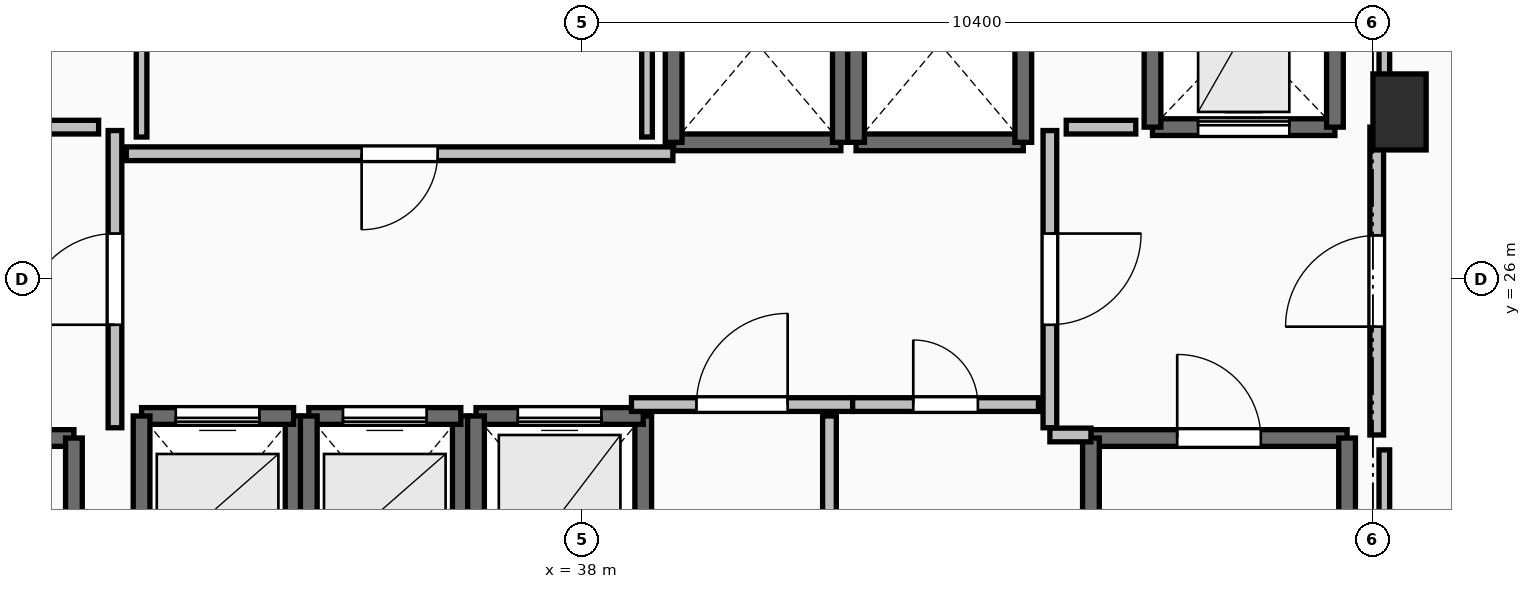
"""IFC4 building model, lengths in metres.
Left out: names, types, materials, properties, quantities, classifications, styles, units other than length and angle.
Written with IfcOpenShell. Run it as: python <this file> out.ifc"""

import sys

from ifc_helpers import new_model, si_unit, direction, frame, frame_2d, origin, origin_2d, place, context, subcontext, project, spatial, rectangle, extrude, element, fill, save


model = new_model("IFC4")
c1 = context("Model", 3, precision=1e-05, world=origin(), true_north=direction((0.0, 1.0)))
c2 = subcontext(c1, "Body", "Model", "MODEL_VIEW")
j1 = project(units=[si_unit("LENGTHUNIT", "METRE"), si_unit("PLANEANGLEUNIT", "RADIAN")], contexts=[c1])
p1 = place(None, origin())
s1 = spatial("IfcSite", under=j1, at=p1, CompositionType="ELEMENT")
p2 = place(p1, origin())
s2 = spatial("IfcBuilding", under=s1, at=p2, CompositionType="ELEMENT")
p3 = place(p2, frame((0.0, 0.0, 179.1)))
s3 = spatial("IfcBuildingStorey", under=s2, at=p3, CompositionType="ELEMENT", Elevation=179.1)
p4 = place(p3, frame((48.75, 28.2, 0.0), z_axis=(0.0, 0.0, 1.0), x_axis=(1.0, 0.0, 0.0)))
e1 = element("IfcColumn", 1, at=p4, inside=s3, PredefinedType="PILASTER", context=c2, shape_type="SweptSolid", body=[
    extrude(rectangle(XDim=0.7, YDim=1.0, at=origin_2d()), origin(), (0.0, 0.0, 1.0), 3.5),
])
p5 = place(p3, frame((27.94, 23.91, 0.0), z_axis=(0.0, 0.0, 1.0), x_axis=(1.0, 0.0, 0.0)))
e2 = element("IfcWall", 2, at=p5, inside=s3, PredefinedType="SOLIDWALL", context=c2, shape_type="SweptSolid", body=[
    extrude(rectangle(XDim=3.37, YDim=0.22, at=frame_2d((1.685, 0.0))), origin(), (0.0, 0.0, 1.0), 3.24),
])
p6 = place(p5, frame((1.135, 0.0, 0.0)))
e3 = element("IfcOpeningElement", 3, at=p6, cuts=e2, PredefinedType="OPENING", context=c2, shape_type="SweptSolid", body=[
    extrude(rectangle(XDim=1.1, YDim=2.15, at=frame_2d((0.55, 1.075))), frame((0.0, 0.125, 0.0), z_axis=(0.0, -1.0, 0.0), x_axis=(1.0, 0.0, 0.0)), (0.0, 0.0, 1.0), 0.25),
])
p7 = place(p3, frame((31.31, 23.91, 0.0), z_axis=(0.0, 0.0, 1.0), x_axis=(0.0, -1.0, 0.0)))
e4 = element("IfcWall", 4, at=p7, inside=s3, PredefinedType="SOLIDWALL", context=c2, shape_type="SweptSolid", body=[
    extrude(rectangle(XDim=7.42, YDim=0.22, at=frame_2d((3.71, 0.0))), origin(), (0.0, 0.0, 1.0), 3.24),
])
p8 = place(p3, frame((44.69, 23.91, 0.0), z_axis=(0.0, 0.0, 1.0), x_axis=(1.0, 0.0, 0.0)))
e5 = element("IfcWall", 5, at=p8, inside=s3, PredefinedType="SOLIDWALL", context=c2, shape_type="SweptSolid", body=[
    extrude(rectangle(XDim=3.37, YDim=0.22, at=frame_2d((1.685, 0.0))), origin(), (0.0, 0.0, 1.0), 3.24),
])
p9 = place(p8, frame((1.135, 0.0, 0.0)))
e6 = element("IfcOpeningElement", 6, at=p9, cuts=e5, PredefinedType="OPENING", context=c2, shape_type="SweptSolid", body=[
    extrude(rectangle(XDim=1.1, YDim=2.15, at=frame_2d((0.55, 1.075))), frame((0.0, 0.125, 0.0), z_axis=(0.0, -1.0, 0.0), x_axis=(1.0, 0.0, 0.0)), (0.0, 0.0, 1.0), 0.25),
])
for number, where, z_axis, x_axis in (
    (7, (48.06, 23.91, 0.0), (0.0, 0.0, 1.0), (0.0, -1.0, 0.0)),
    (8, (44.69, 16.49, 0.0), (0.0, 0.0, 1.0), (0.0, 1.0, 0.0)),
):
    element("IfcWall", number, at=place(p3, frame(where, z_axis=z_axis, x_axis=x_axis)), inside=s3, PredefinedType="SOLIDWALL", context=c2, shape_type="SweptSolid", body=[
        extrude(rectangle(XDim=7.42, YDim=0.22, at=frame_2d((3.71, 0.0))), origin(), (0.0, 0.0, 1.0), 3.24),
    ])
p10 = place(p3, frame((34.2, 21.8, 0.0), z_axis=(0.0, 0.0, 1.0), x_axis=(0.0, 1.0, 0.0)))
e9 = element("IfcWall", 9, at=p10, inside=s3, PredefinedType="SOLIDWALL", context=c2, shape_type="SweptSolid", body=[
    extrude(rectangle(XDim=2.4, YDim=0.22, at=frame_2d((1.2, 0.0))), origin(), (0.0, 0.0, 1.0), 3.24),
])
p11 = place(p3, frame((34.2, 24.2, 0.0), z_axis=(0.0, 0.0, 1.0), x_axis=(-1.0, 0.0, 0.0)))
e10 = element("IfcWall", 10, at=p11, inside=s3, PredefinedType="SOLIDWALL", context=c2, shape_type="SweptSolid", body=[
    extrude(rectangle(XDim=2.0, YDim=0.22, at=frame_2d((1.0, 0.0))), origin(), (0.0, 0.0, 1.0), 3.24),
])
p12 = place(p11, frame((0.45, 0.0, 0.0)))
e11 = element("IfcOpeningElement", 11, at=p12, cuts=e10, PredefinedType="OPENING", context=c2, shape_type="SweptSolid", body=[
    extrude(rectangle(XDim=1.1, YDim=2.2, at=frame_2d((0.55, 1.1))), frame((0.0, 0.125, 0.0), z_axis=(0.0, -1.0, 0.0), x_axis=(1.0, 0.0, 0.0)), (0.0, 0.0, 1.0), 0.25),
])
for number, where, z_axis, x_axis in (
    (12, (32.2, 24.2, 0.0), (0.0, 0.0, 1.0), (0.0, -1.0, 0.0)),
    (13, (36.4, 21.8, 0.0), (0.0, 0.0, 1.0), (0.0, 1.0, 0.0)),
):
    element("IfcWall", number, at=place(p3, frame(where, z_axis=z_axis, x_axis=x_axis)), inside=s3, PredefinedType="SOLIDWALL", context=c2, shape_type="SweptSolid", body=[
        extrude(rectangle(XDim=2.4, YDim=0.22, at=frame_2d((1.2, 0.0))), origin(), (0.0, 0.0, 1.0), 3.24),
    ])
p13 = place(p3, frame((36.4, 24.2, 0.0), z_axis=(0.0, 0.0, 1.0), x_axis=(-1.0, 0.0, 0.0)))
e14 = element("IfcWall", 14, at=p13, inside=s3, PredefinedType="SOLIDWALL", context=c2, shape_type="SweptSolid", body=[
    extrude(rectangle(XDim=2.0, YDim=0.22, at=frame_2d((1.0, 0.0))), origin(), (0.0, 0.0, 1.0), 3.24),
])
p14 = place(p13, frame((0.45, 0.0, 0.0)))
e15 = element("IfcOpeningElement", 15, at=p14, cuts=e14, PredefinedType="OPENING", context=c2, shape_type="SweptSolid", body=[
    extrude(rectangle(XDim=1.1, YDim=2.2, at=frame_2d((0.55, 1.1))), frame((0.0, 0.125, 0.0), z_axis=(0.0, -1.0, 0.0), x_axis=(1.0, 0.0, 0.0)), (0.0, 0.0, 1.0), 0.25),
])
p15 = place(p3, frame((34.4, 24.2, 0.0), z_axis=(0.0, 0.0, 1.0), x_axis=(0.0, -1.0, 0.0)))
e16 = element("IfcWall", 16, at=p15, inside=s3, PredefinedType="SOLIDWALL", context=c2, shape_type="SweptSolid", body=[
    extrude(rectangle(XDim=2.4, YDim=0.22, at=frame_2d((1.2, 0.0))), origin(), (0.0, 0.0, 1.0), 3.24),
])
p16 = place(p3, frame((38.8, 21.6, 0.0), z_axis=(0.0, 0.0, 1.0), x_axis=(0.0, 1.0, 0.0)))
e17 = element("IfcWall", 17, at=p16, inside=s3, PredefinedType="SOLIDWALL", context=c2, shape_type="SweptSolid", body=[
    extrude(rectangle(XDim=2.6, YDim=0.22, at=frame_2d((1.3, 0.0))), origin(), (0.0, 0.0, 1.0), 3.24),
])
p17 = place(p3, frame((38.8, 24.2, 0.0), z_axis=(0.0, 0.0, 1.0), x_axis=(-1.0, 0.0, 0.0)))
e18 = element("IfcWall", 18, at=p17, inside=s3, PredefinedType="SOLIDWALL", context=c2, shape_type="SweptSolid", body=[
    extrude(rectangle(XDim=2.2, YDim=0.22, at=frame_2d((1.1, 0.0))), origin(), (0.0, 0.0, 1.0), 3.24),
])
p18 = place(p17, frame((0.55, 0.0, 0.0)))
e19 = element("IfcOpeningElement", 19, at=p18, cuts=e18, PredefinedType="OPENING", context=c2, shape_type="SweptSolid", body=[
    extrude(rectangle(XDim=1.1, YDim=2.2, at=frame_2d((0.55, 1.1))), frame((0.0, 0.125, 0.0), z_axis=(0.0, -1.0, 0.0), x_axis=(1.0, 0.0, 0.0)), (0.0, 0.0, 1.0), 0.25),
])
p19 = place(p3, frame((36.6, 24.2, 0.0), z_axis=(0.0, 0.0, 1.0), x_axis=(0.0, -1.0, 0.0)))
e20 = element("IfcWall", 20, at=p19, inside=s3, PredefinedType="SOLIDWALL", context=c2, shape_type="SweptSolid", body=[
    extrude(rectangle(XDim=2.6, YDim=0.22, at=frame_2d((1.3, 0.0))), origin(), (0.0, 0.0, 1.0), 3.24),
])
p20 = place(p3, frame((39.2, 27.8, 0.0), z_axis=(0.0, 0.0, 1.0), x_axis=(1.0, 0.0, 0.0)))
e21 = element("IfcWall", 21, at=p20, inside=s3, PredefinedType="SOLIDWALL", context=c2, shape_type="SweptSolid", body=[
    extrude(rectangle(XDim=2.2, YDim=0.22, at=frame_2d((1.1, 0.0))), origin(), (0.0, 0.0, 1.0), 3.24),
])
for number, where, z_axis, x_axis in (
    (22, (41.4, 27.8, 0.0), (0.0, 0.0, 1.0), (0.0, 1.0, 0.0)),
    (23, (39.2, 30.4, 0.0), (0.0, 0.0, 1.0), (0.0, -1.0, 0.0)),
):
    element("IfcWall", number, at=place(p3, frame(where, z_axis=z_axis, x_axis=x_axis)), inside=s3, PredefinedType="SOLIDWALL", context=c2, shape_type="SweptSolid", body=[
        extrude(rectangle(XDim=2.6, YDim=0.22, at=frame_2d((1.3, 0.0))), origin(), (0.0, 0.0, 1.0), 3.24),
    ])
p21 = place(p3, frame((41.6, 27.8, 0.0), z_axis=(0.0, 0.0, 1.0), x_axis=(1.0, 0.0, 0.0)))
e24 = element("IfcWall", 24, at=p21, inside=s3, PredefinedType="SOLIDWALL", context=c2, shape_type="SweptSolid", body=[
    extrude(rectangle(XDim=2.2, YDim=0.22, at=frame_2d((1.1, 0.0))), origin(), (0.0, 0.0, 1.0), 3.24),
])
for number, where, z_axis, x_axis in (
    (25, (43.8, 27.8, 0.0), (0.0, 0.0, 1.0), (0.0, 1.0, 0.0)),
    (26, (41.6, 30.4, 0.0), (0.0, 0.0, 1.0), (0.0, -1.0, 0.0)),
):
    element("IfcWall", number, at=place(p3, frame(where, z_axis=z_axis, x_axis=x_axis)), inside=s3, PredefinedType="SOLIDWALL", context=c2, shape_type="SweptSolid", body=[
        extrude(rectangle(XDim=2.6, YDim=0.22, at=frame_2d((1.3, 0.0))), origin(), (0.0, 0.0, 1.0), 3.24),
    ])
p22 = place(p3, frame((45.5, 28.0, 0.0), z_axis=(0.0, 0.0, 1.0), x_axis=(1.0, 0.0, 0.0)))
e27 = element("IfcWall", 27, at=p22, inside=s3, PredefinedType="SHEAR", context=c2, shape_type="SweptSolid", body=[
    extrude(rectangle(XDim=2.4, YDim=0.22, at=frame_2d((1.2, 0.0))), origin(), (0.0, 0.0, 1.0), 3.24),
])
p23 = place(p22, frame((0.6, 0.0, 0.0)))
e28 = element("IfcOpeningElement", 28, at=p23, cuts=e27, PredefinedType="OPENING", context=c2, shape_type="SweptSolid", body=[
    extrude(rectangle(XDim=1.2, YDim=2.2, at=frame_2d((0.6, 1.1))), frame((0.0, 0.125, 0.0), z_axis=(0.0, -1.0, 0.0), x_axis=(1.0, 0.0, 0.0)), (0.0, 0.0, 1.0), 0.25),
])
for number, where, z_axis, x_axis in (
    (29, (47.9, 28.0, 0.0), (0.0, 0.0, 1.0), (0.0, 1.0, 0.0)),
    (30, (45.5, 30.5, 0.0), (0.0, 0.0, 1.0), (0.0, -1.0, 0.0)),
):
    element("IfcWall", number, at=place(p3, frame(where, z_axis=z_axis, x_axis=x_axis)), inside=s3, PredefinedType="SHEAR", context=c2, shape_type="SweptSolid", body=[
        extrude(rectangle(XDim=2.5, YDim=0.22, at=frame_2d((1.25, 0.0))), origin(), (0.0, 0.0, 1.0), 3.24),
    ])
p24 = place(p3, frame((31.85, 24.045, 0.0), z_axis=(0.0, 0.0, 1.0), x_axis=(0.0, 1.0, 0.0)))
e31 = element("IfcWall", 31, at=p24, inside=s3, PredefinedType="PARTITIONING", context=c2, shape_type="SweptSolid", body=[
    extrude(rectangle(XDim=3.91, YDim=0.18, at=frame_2d((1.955, 0.0))), origin(), (0.0, 0.0, 1.0), 3.24),
])
p25 = place(p24, frame((1.355, 0.0, 0.0)))
e32 = element("IfcOpeningElement", 32, at=p25, cuts=e31, PredefinedType="OPENING", context=c2, shape_type="SweptSolid", body=[
    extrude(rectangle(XDim=1.2, YDim=2.15, at=frame_2d((0.6, 1.075))), frame((0.0, 0.105, 0.0), z_axis=(0.0, -1.0, 0.0), x_axis=(1.0, 0.0, 0.0)), (0.0, 0.0, 1.0), 0.21),
])
p26 = place(p3, frame((44.15, 27.955, 0.0), z_axis=(0.0, 0.0, 1.0), x_axis=(0.0, -1.0, 0.0)))
e33 = element("IfcWall", 33, at=p26, inside=s3, PredefinedType="PARTITIONING", context=c2, shape_type="SweptSolid", body=[
    extrude(rectangle(XDim=3.91, YDim=0.18, at=frame_2d((1.955, 0.0))), origin(), (0.0, 0.0, 1.0), 3.24),
])
p27 = place(p26, frame((1.355, 0.0, 0.0)))
e34 = element("IfcOpeningElement", 34, at=p27, cuts=e33, PredefinedType="OPENING", context=c2, shape_type="SweptSolid", body=[
    extrude(rectangle(XDim=1.2, YDim=2.15, at=frame_2d((0.6, 1.075))), frame((0.0, 0.105, 0.0), z_axis=(0.0, -1.0, 0.0), x_axis=(1.0, 0.0, 0.0)), (0.0, 0.0, 1.0), 0.21),
])
p28 = place(p3, frame((44.15, 23.95, 0.0), z_axis=(0.0, 0.0, 1.0), x_axis=(1.0, 0.0, 0.0)))
e35 = element("IfcWall", 35, at=p28, inside=s3, PredefinedType="PARTITIONING", context=c2, shape_type="SweptSolid", body=[
    extrude(rectangle(XDim=0.54, YDim=0.18, at=frame_2d((0.27, 0.0))), origin(), (0.0, 0.0, 1.0), 3.24),
])
p29 = place(p3, frame((48.45, 23.95, 0.0), z_axis=(0.0, 0.0, 1.0), x_axis=(0.0, 1.0, 0.0)))
e36 = element("IfcWall", 36, at=p29, inside=s3, PredefinedType="PARTITIONING", context=c2, shape_type="SweptSolid", body=[
    extrude(rectangle(XDim=4.05, YDim=0.18, at=frame_2d((2.025, 0.0))), origin(), (0.0, 0.0, 1.0), 3.24),
])
p30 = place(p29, frame((1.425, 0.0, 0.0)))
e37 = element("IfcOpeningElement", 37, at=p30, cuts=e36, PredefinedType="OPENING", context=c2, shape_type="SweptSolid", body=[
    extrude(rectangle(XDim=1.2, YDim=2.15, at=frame_2d((0.6, 1.075))), frame((0.0, 0.105, 0.0), z_axis=(0.0, -1.0, 0.0), x_axis=(1.0, 0.0, 0.0)), (0.0, 0.0, 1.0), 0.21),
])
p31 = place(p3, frame((38.645, 24.35, 0.0), z_axis=(0.0, 0.0, 1.0), x_axis=(1.0, 0.0, 0.0)))
e38 = element("IfcWall", 38, at=p31, inside=s3, PredefinedType="PARTITIONING", context=c2, shape_type="SweptSolid", body=[
    extrude(rectangle(XDim=2.91, YDim=0.18, at=frame_2d((1.455, 0.0))), origin(), (0.0, 0.0, 1.0), 3.24),
])
p32 = place(p31, frame((0.855, 0.0, 0.0)))
e39 = element("IfcOpeningElement", 39, at=p32, cuts=e38, PredefinedType="OPENING", context=c2, shape_type="SweptSolid", body=[
    extrude(rectangle(XDim=1.2, YDim=2.15, at=frame_2d((0.6, 1.075))), frame((0.0, 0.105, 0.0), z_axis=(0.0, -1.0, 0.0), x_axis=(1.0, 0.0, 0.0)), (0.0, 0.0, 1.0), 0.21),
])
p33 = place(p3, frame((41.555, 24.35, 0.0), z_axis=(0.0, 0.0, 1.0), x_axis=(1.0, 0.0, 0.0)))
e40 = element("IfcWall", 40, at=p33, inside=s3, PredefinedType="PARTITIONING", context=c2, shape_type="SweptSolid", body=[
    extrude(rectangle(XDim=2.445, YDim=0.18, at=frame_2d((1.223, 0.0))), origin(), (0.0, 0.0, 1.0), 3.24),
])
p34 = place(p33, frame((0.798, 0.0, 0.0)))
e41 = element("IfcOpeningElement", 41, at=p34, cuts=e40, PredefinedType="OPENING", context=c2, shape_type="SweptSolid", body=[
    extrude(rectangle(XDim=0.85, YDim=2.1, at=frame_2d((0.425, 1.05))), frame((0.0, 0.105, 0.0), z_axis=(0.0, -1.0, 0.0), x_axis=(1.0, 0.0, 0.0)), (0.0, 0.0, 1.0), 0.21),
])
p35 = place(p3, frame((39.19, 27.65, 0.0), z_axis=(0.0, 0.0, 1.0), x_axis=(-1.0, 0.0, 0.0)))
e42 = element("IfcWall", 42, at=p35, inside=s3, PredefinedType="PARTITIONING", context=c2, shape_type="SweptSolid", body=[
    extrude(rectangle(XDim=7.19, YDim=0.18, at=frame_2d((3.595, 0.0))), origin(), (0.0, 0.0, 1.0), 3.24),
])
p36 = place(p35, frame((3.095, 0.0, 0.0)))
e43 = element("IfcOpeningElement", 43, at=p36, cuts=e42, PredefinedType="OPENING", context=c2, shape_type="SweptSolid", body=[
    extrude(rectangle(XDim=1.0, YDim=2.15, at=frame_2d((0.5, 1.075))), frame((0.0, 0.105, 0.0), z_axis=(0.0, -1.0, 0.0), x_axis=(1.0, 0.0, 0.0)), (0.0, 0.0, 1.0), 0.21),
])
p37 = place(p3, frame((41.25, 20.305, 0.0), z_axis=(0.0, 0.0, 1.0), x_axis=(0.0, 1.0, 0.0)))
e44 = element("IfcWall", 44, at=p37, inside=s3, PredefinedType="PARTITIONING", context=c2, shape_type="SweptSolid", body=[
    extrude(rectangle(XDim=3.895, YDim=0.18, at=frame_2d((1.948, 0.0))), origin(), (0.0, 0.0, 1.0), 3.24),
])
p38 = place(p37, frame((1.522, 0.0, 0.0)))
e45 = element("IfcOpeningElement", 45, at=p38, cuts=e44, PredefinedType="OPENING", context=c2, shape_type="SweptSolid", body=[
    extrude(rectangle(XDim=0.85, YDim=2.1, at=frame_2d((0.425, 1.05))), frame((0.0, 0.105, 0.0), z_axis=(0.0, -1.0, 0.0), x_axis=(1.0, 0.0, 0.0)), (0.0, 0.0, 1.0), 0.21),
])
for number, where, z_axis, x_axis in (
    (46, (31.635, 28.0, 0.0), (0.0, 0.0, 1.0), (-1.0, 0.0, 0.0)),
    (47, (45.28, 28.0, 0.0), (0.0, 0.0, 1.0), (-1.0, 0.0, 0.0)),
):
    element("IfcWall", number, at=place(p3, frame(where, z_axis=z_axis, x_axis=x_axis)), inside=s3, PredefinedType="PARTITIONING", context=c2, shape_type="SweptSolid", body=[
        extrude(rectangle(XDim=0.915, YDim=0.18, at=frame_2d((0.458, 0.0))), origin(), (0.0, 0.0, 1.0), 3.24),
    ])
for number, where, z_axis, x_axis in (
    (48, (32.2, 30.26, 0.0), (0.0, 0.0, 1.0), (0.0, -1.0, 0.0)),
    (49, (38.85, 27.87, 0.0), (0.0, 0.0, 1.0), (0.0, 1.0, 0.0)),
):
    element("IfcWall", number, at=place(p3, frame(where, z_axis=z_axis, x_axis=x_axis)), inside=s3, PredefinedType="PARTITIONING", context=c2, shape_type="SweptSolid", body=[
        extrude(rectangle(XDim=2.39, YDim=0.14, at=frame_2d((1.195, 0.0))), origin(), (0.0, 0.0, 1.0), 3.24),
    ])
p39 = place(p3, frame((48.55, 16.24, 0.0), z_axis=(0.0, 0.0, 1.0), x_axis=(0.0, 1.0, 0.0)))
e50 = element("IfcWall", 50, at=p39, inside=s3, PredefinedType="PARTITIONING", context=c2, shape_type="SweptSolid", body=[
    extrude(rectangle(XDim=7.514, YDim=0.14, at=frame_2d((3.757, 0.0))), origin(), (0.0, 0.0, 1.0), 2.432),
])
p40 = place(p3, frame((48.55, 28.196, 0.0), z_axis=(0.0, 0.0, 1.0), x_axis=(0.0, 1.0, 0.0)))
e51 = element("IfcWall", 51, at=p40, inside=s3, PredefinedType="PARTITIONING", context=c2, shape_type="SweptSolid", body=[
    extrude(rectangle(XDim=5.254, YDim=0.14, at=frame_2d((2.627, 0.0))), origin(), (0.0, 0.0, 1.0), 2.432),
])
p41 = place(p9, origin())
e52 = element("IfcDoor", 52, at=p41, inside=s3, OperationType="SINGLE_SWING_LEFT", PredefinedType="DOOR", context=c2, shape_type="SweptSolid", body=[
    extrude(rectangle(XDim=1.1, YDim=2.15, at=frame_2d((0.55, 1.075))), frame((0.0, 0.025, 0.0), z_axis=(0.0, -1.0, 0.0), x_axis=(1.0, 0.0, 0.0)), (0.0, 0.0, 1.0), 0.05),
])
fill(e6, e52)
p42 = place(p12, origin())
e53 = element("IfcDoor", 53, at=p42, inside=s3, OperationType="SLIDING_TO_LEFT", PredefinedType="DOOR", context=c2, shape_type="SweptSolid", body=[
    extrude(rectangle(XDim=1.1, YDim=2.2, at=frame_2d((0.55, 1.1))), frame((0.0, 0.025, 0.0), z_axis=(0.0, -1.0, 0.0), x_axis=(1.0, 0.0, 0.0)), (0.0, 0.0, 1.0), 0.05),
])
fill(e11, e53)
p43 = place(p14, origin())
e54 = element("IfcDoor", 54, at=p43, inside=s3, OperationType="SLIDING_TO_LEFT", PredefinedType="DOOR", context=c2, shape_type="SweptSolid", body=[
    extrude(rectangle(XDim=1.1, YDim=2.2, at=frame_2d((0.55, 1.1))), frame((0.0, 0.025, 0.0), z_axis=(0.0, -1.0, 0.0), x_axis=(1.0, 0.0, 0.0)), (0.0, 0.0, 1.0), 0.05),
])
fill(e15, e54)
p44 = place(p18, origin())
e55 = element("IfcDoor", 55, at=p44, inside=s3, OperationType="SLIDING_TO_LEFT", PredefinedType="DOOR", context=c2, shape_type="SweptSolid", body=[
    extrude(rectangle(XDim=1.1, YDim=2.2, at=frame_2d((0.55, 1.1))), frame((0.0, 0.025, 0.0), z_axis=(0.0, -1.0, 0.0), x_axis=(1.0, 0.0, 0.0)), (0.0, 0.0, 1.0), 0.05),
])
fill(e19, e55)
p45 = place(p23, origin())
e56 = element("IfcDoor", 56, at=p45, inside=s3, OperationType="SLIDING_TO_LEFT", PredefinedType="DOOR", context=c2, shape_type="SweptSolid", body=[
    extrude(rectangle(XDim=1.2, YDim=2.2, at=frame_2d((0.6, 1.1))), frame((0.0, 0.025, 0.0), z_axis=(0.0, -1.0, 0.0), x_axis=(1.0, 0.0, 0.0)), (0.0, 0.0, 1.0), 0.05),
])
fill(e28, e56)
p46 = place(p25, origin())
e57 = element("IfcDoor", 57, at=p46, inside=s3, OperationType="SINGLE_SWING_LEFT", PredefinedType="DOOR", context=c2, shape_type="SweptSolid", body=[
    extrude(rectangle(XDim=1.2, YDim=2.15, at=frame_2d((0.6, 1.075))), frame((0.0, 0.025, 0.0), z_axis=(0.0, -1.0, 0.0), x_axis=(1.0, 0.0, 0.0)), (0.0, 0.0, 1.0), 0.05),
])
fill(e32, e57)
p47 = place(p27, origin())
e58 = element("IfcDoor", 58, at=p47, inside=s3, OperationType="SINGLE_SWING_LEFT", PredefinedType="DOOR", context=c2, shape_type="SweptSolid", body=[
    extrude(rectangle(XDim=1.2, YDim=2.15, at=frame_2d((0.6, 1.075))), frame((0.0, 0.025, 0.0), z_axis=(0.0, -1.0, 0.0), x_axis=(1.0, 0.0, 0.0)), (0.0, 0.0, 1.0), 0.05),
])
fill(e34, e58)
p48 = place(p30, origin())
e59 = element("IfcDoor", 59, at=p48, inside=s3, OperationType="SINGLE_SWING_LEFT", PredefinedType="DOOR", context=c2, shape_type="SweptSolid", body=[
    extrude(rectangle(XDim=1.2, YDim=2.15, at=frame_2d((0.6, 1.075))), frame((0.0, 0.025, 0.0), z_axis=(0.0, -1.0, 0.0), x_axis=(1.0, 0.0, 0.0)), (0.0, 0.0, 1.0), 0.05),
])
fill(e37, e59)
p49 = place(p32, origin())
e60 = element("IfcDoor", 60, at=p49, inside=s3, OperationType="SINGLE_SWING_RIGHT", PredefinedType="DOOR", context=c2, shape_type="SweptSolid", body=[
    extrude(rectangle(XDim=1.2, YDim=2.15, at=frame_2d((0.6, 1.075))), frame((0.0, 0.025, 0.0), z_axis=(0.0, -1.0, 0.0), x_axis=(1.0, 0.0, 0.0)), (0.0, 0.0, 1.0), 0.05),
])
fill(e39, e60)
p50 = place(p34, origin())
e61 = element("IfcDoor", 61, at=p50, inside=s3, OperationType="SINGLE_SWING_LEFT", PredefinedType="DOOR", context=c2, shape_type="SweptSolid", body=[
    extrude(rectangle(XDim=0.85, YDim=2.1, at=frame_2d((0.425, 1.05))), frame((0.0, 0.025, 0.0), z_axis=(0.0, -1.0, 0.0), x_axis=(1.0, 0.0, 0.0)), (0.0, 0.0, 1.0), 0.05),
])
fill(e41, e61)
p51 = place(p36, origin())
e62 = element("IfcDoor", 62, at=p51, inside=s3, OperationType="SINGLE_SWING_RIGHT", PredefinedType="DOOR", context=c2, shape_type="SweptSolid", body=[
    extrude(rectangle(XDim=1.0, YDim=2.15, at=frame_2d((0.5, 1.075))), frame((0.0, 0.025, 0.0), z_axis=(0.0, -1.0, 0.0), x_axis=(1.0, 0.0, 0.0)), (0.0, 0.0, 1.0), 0.05),
])
fill(e43, e62)
save(model, sys.argv[1])
